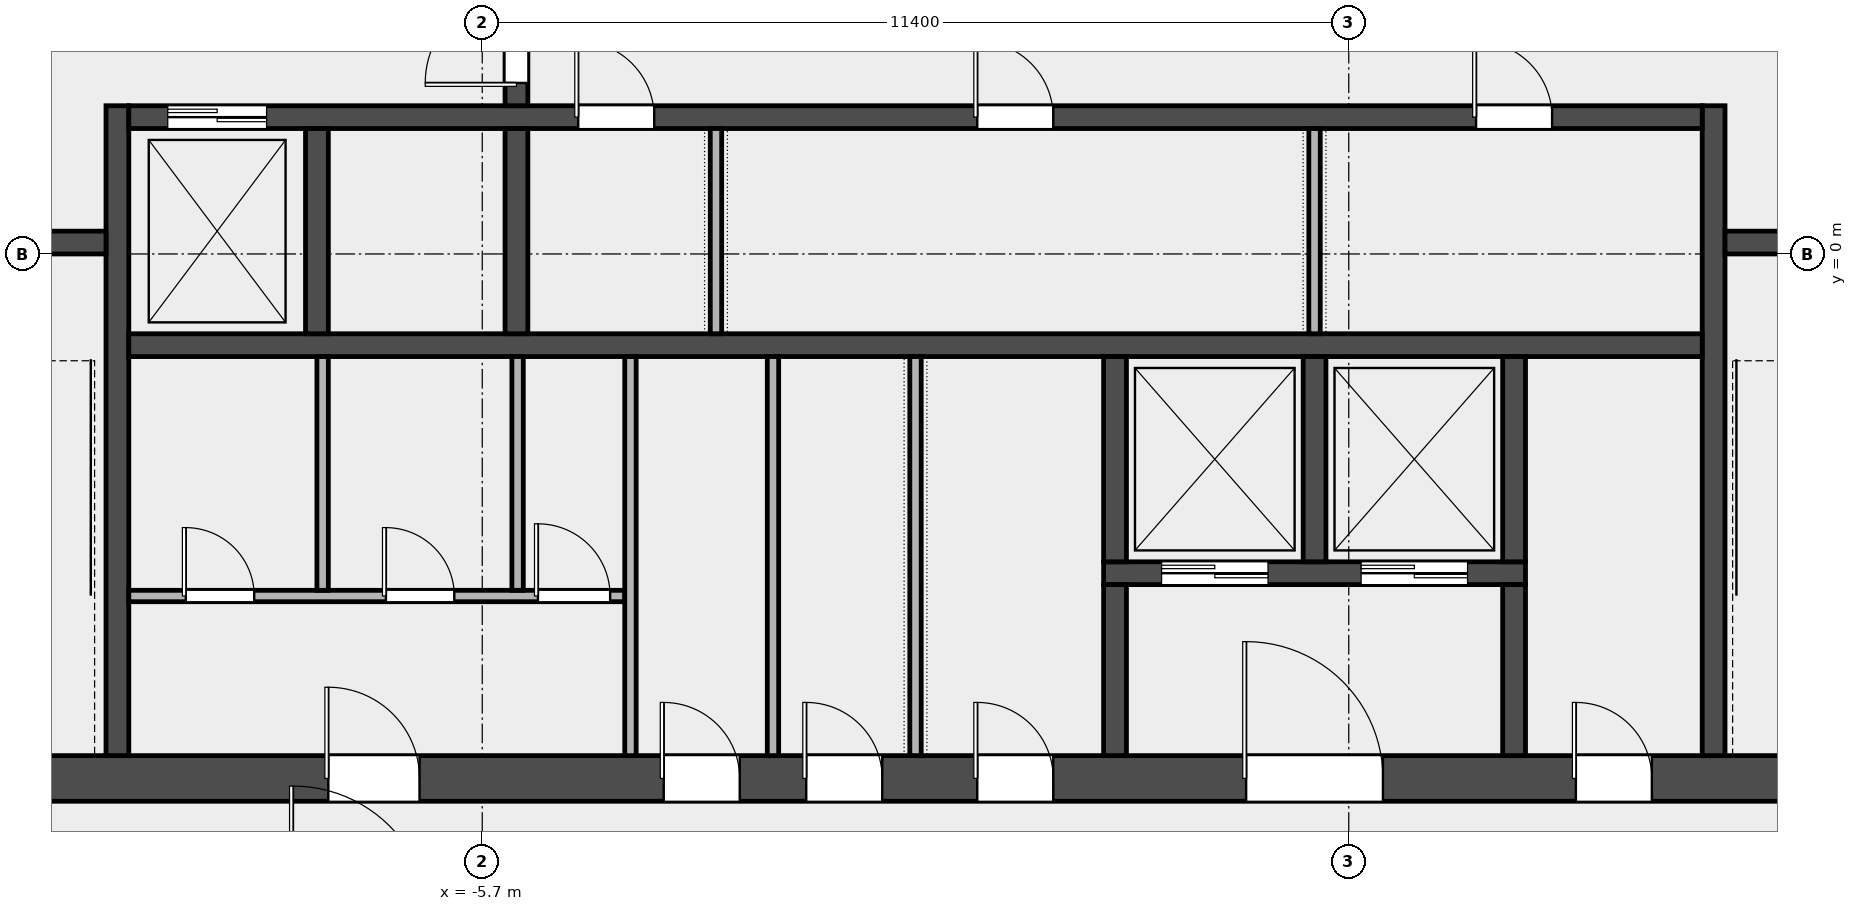
"""IFC4 building model, lengths in metres.
Left out: names, types, materials, properties, quantities, classifications, styles, units other than length and angle.
Written with IfcOpenShell. Run it as: python <this file> out.ifc"""

import sys

from ifc_helpers import new_model, si_unit, direction, frame, frame_2d, origin, place, context, subcontext, project, spatial, rectangle, extrude, element, fill, save


model = new_model("IFC4")
c1 = context("Model", 3, precision=1e-05, world=origin(), true_north=direction((0.0, 1.0)))
c2 = subcontext(c1, "Body", "Model", "MODEL_VIEW")
j1 = project(units=[si_unit("LENGTHUNIT", "METRE"), si_unit("PLANEANGLEUNIT", "RADIAN")], contexts=[c1])
p1 = place(None, origin())
s1 = spatial("IfcSite", under=j1, at=p1, CompositionType="ELEMENT")
p2 = place(p1, origin())
s2 = spatial("IfcBuilding", under=s1, at=p2, CompositionType="ELEMENT")
p3 = place(p2, frame((0.0, 0.0, 353.4)))
s3 = spatial("IfcBuildingStorey", under=s2, at=p3, CompositionType="ELEMENT", Elevation=353.4)
p4 = place(p3, frame((-14.4, -6.9, 0.0), z_axis=(0.0, 0.0, 1.0), x_axis=(1.0, 0.0, 0.0)))
e1 = element("IfcWall", 1, at=p4, inside=s3, PredefinedType="SHEAR", context=c2, shape_type="SweptSolid", body=[
    extrude(rectangle(XDim=28.8, YDim=0.6, at=frame_2d((14.4, 0.0))), origin(), (0.0, 0.0, 1.0), 3.7),
])
p5 = place(p4, frame((6.675, 0.0, 0.0)))
e2 = element("IfcOpeningElement", 2, at=p5, cuts=e1, PredefinedType="OPENING", context=c2, shape_type="SweptSolid", body=[
    extrude(rectangle(XDim=1.2, YDim=2.1, at=frame_2d((0.6, 1.05))), frame((0.0, 0.312, 0.0), z_axis=(0.0, -1.0, 0.0), x_axis=(1.0, 0.0, 0.0)), (0.0, 0.0, 1.0), 0.624),
])
p6 = place(p4, frame((11.087, 0.0, 0.0)))
e3 = element("IfcOpeningElement", 3, at=p6, cuts=e1, PredefinedType="OPENING", context=c2, shape_type="SweptSolid", body=[
    extrude(rectangle(XDim=1.0, YDim=2.1, at=frame_2d((0.5, 1.05))), frame((0.0, 0.312, 0.0), z_axis=(0.0, -1.0, 0.0), x_axis=(1.0, 0.0, 0.0)), (0.0, 0.0, 1.0), 0.624),
])
p7 = place(p4, frame((12.962, 0.0, 0.0)))
e4 = element("IfcOpeningElement", 4, at=p7, cuts=e1, PredefinedType="OPENING", context=c2, shape_type="SweptSolid", body=[
    extrude(rectangle(XDim=1.0, YDim=2.1, at=frame_2d((0.5, 1.05))), frame((0.0, 0.312, 0.0), z_axis=(0.0, -1.0, 0.0), x_axis=(1.0, 0.0, 0.0)), (0.0, 0.0, 1.0), 0.624),
])
p8 = place(p4, frame((15.212, 0.0, 0.0)))
e5 = element("IfcOpeningElement", 5, at=p8, cuts=e1, PredefinedType="OPENING", context=c2, shape_type="SweptSolid", body=[
    extrude(rectangle(XDim=1.0, YDim=2.1, at=frame_2d((0.5, 1.05))), frame((0.0, 0.312, 0.0), z_axis=(0.0, -1.0, 0.0), x_axis=(1.0, 0.0, 0.0)), (0.0, 0.0, 1.0), 0.624),
])
p9 = place(p4, frame((18.75, 0.0, 0.0)))
e6 = element("IfcOpeningElement", 6, at=p9, cuts=e1, PredefinedType="OPENING", context=c2, shape_type="SweptSolid", body=[
    extrude(rectangle(XDim=1.8, YDim=2.1, at=frame_2d((0.9, 1.05))), frame((0.0, 0.312, 0.0), z_axis=(0.0, -1.0, 0.0), x_axis=(1.0, 0.0, 0.0)), (0.0, 0.0, 1.0), 0.624),
])
p10 = place(p4, frame((23.087, 0.0, 0.0)))
e7 = element("IfcOpeningElement", 7, at=p10, cuts=e1, PredefinedType="OPENING", context=c2, shape_type="SweptSolid", body=[
    extrude(rectangle(XDim=1.0, YDim=2.1, at=frame_2d((0.5, 1.05))), frame((0.0, 0.312, 0.0), z_axis=(0.0, -1.0, 0.0), x_axis=(1.0, 0.0, 0.0)), (0.0, 0.0, 1.0), 0.624),
])
for number, where, z_axis, x_axis in (
    (8, (-10.5, -6.6, 0.0), (0.0, 0.0, 1.0), (0.0, 1.0, 0.0)),
    (9, (10.5, -6.6, 0.0), (0.0, 0.0, 1.0), (0.0, 1.0, 0.0)),
):
    element("IfcWall", number, at=place(p3, frame(where, z_axis=z_axis, x_axis=x_axis)), inside=s3, PredefinedType="SHEAR", context=c2, shape_type="SweptSolid", body=[
        extrude(rectangle(XDim=8.55, YDim=0.3, at=frame_2d((4.275, 0.0))), origin(), (0.0, 0.0, 1.0), 3.7),
    ])
p11 = place(p3, frame((-13.8, 0.15, 0.0), z_axis=(0.0, 0.0, 1.0), x_axis=(1.0, 0.0, 0.0)))
e10 = element("IfcWall", 10, at=p11, inside=s3, PredefinedType="SOLIDWALL", context=c2, shape_type="SweptSolid", body=[
    extrude(rectangle(XDim=3.15, YDim=0.3, at=frame_2d((1.575, 0.0))), origin(), (0.0, 0.0, 1.0), 3.7),
])
p12 = place(p11, frame((0.975, 0.0, 0.0)))
e11 = element("IfcOpeningElement", 11, at=p12, cuts=e10, PredefinedType="OPENING", context=c2, shape_type="SweptSolid", body=[
    extrude(rectangle(XDim=1.1, YDim=2.1, at=frame_2d((0.55, 1.05))), frame((0.0, 0.162, 0.0), z_axis=(0.0, -1.0, 0.0), x_axis=(1.0, 0.0, 0.0)), (0.0, 0.0, 1.0), 0.324),
])
p13 = place(p3, frame((10.65, 0.15, 0.0), z_axis=(0.0, 0.0, 1.0), x_axis=(1.0, 0.0, 0.0)))
e12 = element("IfcWall", 12, at=p13, inside=s3, PredefinedType="SOLIDWALL", context=c2, shape_type="SweptSolid", body=[
    extrude(rectangle(XDim=3.15, YDim=0.3, at=frame_2d((1.575, 0.0))), origin(), (0.0, 0.0, 1.0), 3.7),
])
p14 = place(p13, frame((1.025, 0.0, 0.0)))
e13 = element("IfcOpeningElement", 13, at=p14, cuts=e12, PredefinedType="OPENING", context=c2, shape_type="SweptSolid", body=[
    extrude(rectangle(XDim=1.1, YDim=2.1, at=frame_2d((0.55, 1.05))), frame((0.0, 0.162, 0.0), z_axis=(0.0, -1.0, 0.0), x_axis=(1.0, 0.0, 0.0)), (0.0, 0.0, 1.0), 0.324),
])
p15 = place(p3, frame((-10.35, -1.2, 0.0), z_axis=(0.0, 0.0, 1.0), x_axis=(1.0, 0.0, 0.0)))
e14 = element("IfcWall", 14, at=p15, inside=s3, PredefinedType="SOLIDWALL", context=c2, shape_type="SweptSolid", body=[
    extrude(rectangle(XDim=20.7, YDim=0.3, at=frame_2d((10.35, 0.0))), origin(), (0.0, 0.0, 1.0), 3.7),
])
p16 = place(p3, frame((-10.35, 1.8, 0.0), z_axis=(0.0, 0.0, 1.0), x_axis=(1.0, 0.0, 0.0)))
e15 = element("IfcWall", 15, at=p16, inside=s3, PredefinedType="SOLIDWALL", context=c2, shape_type="SweptSolid", body=[
    extrude(rectangle(XDim=20.7, YDim=0.3, at=frame_2d((10.35, 0.0))), origin(), (0.0, 0.0, 1.0), 3.7),
])
p17 = place(p16, frame((0.512, 0.0, 0.0)))
e16 = element("IfcOpeningElement", 16, at=p17, cuts=e15, PredefinedType="OPENING", context=c2, shape_type="SweptSolid", body=[
    extrude(rectangle(XDim=1.3, YDim=2.1, at=frame_2d((0.65, 1.05))), frame((0.0, 0.162, 0.0), z_axis=(0.0, -1.0, 0.0), x_axis=(1.0, 0.0, 0.0)), (0.0, 0.0, 1.0), 0.324),
])
p18 = place(p16, frame((5.913, 0.0, 0.0)))
e17 = element("IfcOpeningElement", 17, at=p18, cuts=e15, PredefinedType="OPENING", context=c2, shape_type="SweptSolid", body=[
    extrude(rectangle(XDim=1.0, YDim=2.1, at=frame_2d((0.5, 1.05))), frame((0.0, 0.162, 0.0), z_axis=(0.0, -1.0, 0.0), x_axis=(1.0, 0.0, 0.0)), (0.0, 0.0, 1.0), 0.324),
])
p19 = place(p16, frame((11.163, 0.0, 0.0)))
e18 = element("IfcOpeningElement", 18, at=p19, cuts=e15, PredefinedType="OPENING", context=c2, shape_type="SweptSolid", body=[
    extrude(rectangle(XDim=1.0, YDim=2.1, at=frame_2d((0.5, 1.05))), frame((0.0, 0.162, 0.0), z_axis=(0.0, -1.0, 0.0), x_axis=(1.0, 0.0, 0.0)), (0.0, 0.0, 1.0), 0.324),
])
p20 = place(p16, frame((17.725, 0.0, 0.0)))
e19 = element("IfcOpeningElement", 19, at=p20, cuts=e15, PredefinedType="OPENING", context=c2, shape_type="SweptSolid", body=[
    extrude(rectangle(XDim=1.0, YDim=2.1, at=frame_2d((0.5, 1.05))), frame((0.0, 0.162, 0.0), z_axis=(0.0, -1.0, 0.0), x_axis=(1.0, 0.0, 0.0)), (0.0, 0.0, 1.0), 0.324),
])
for number, where, z_axis, x_axis in (
    (20, (-7.875, -1.05, 0.0), (0.0, 0.0, 1.0), (0.0, 1.0, 0.0)),
    (21, (-5.25, -1.05, 0.0), (0.0, 0.0, 1.0), (0.0, 1.0, 0.0)),
):
    element("IfcWall", number, at=place(p3, frame(where, z_axis=z_axis, x_axis=x_axis)), inside=s3, PredefinedType="SOLIDWALL", context=c2, shape_type="SweptSolid", body=[
        extrude(rectangle(XDim=2.7, YDim=0.3, at=frame_2d((1.35, 0.0))), origin(), (0.0, 0.0, 1.0), 3.7),
    ])
p21 = place(p3, frame((-5.25, 1.95, 0.0), z_axis=(0.0, 0.0, 1.0), x_axis=(0.0, 1.0, 0.0)))
e22 = element("IfcWall", 22, at=p21, inside=s3, PredefinedType="SOLIDWALL", context=c2, shape_type="SweptSolid", body=[
    extrude(rectangle(XDim=3.3, YDim=0.3, at=frame_2d((1.65, 0.0))), origin(), (0.0, 0.0, 1.0), 3.7),
])
p22 = place(p21, frame((0.3, 0.0, 0.0)))
e23 = element("IfcOpeningElement", 23, at=p22, cuts=e22, PredefinedType="OPENING", context=c2, shape_type="SweptSolid", body=[
    extrude(rectangle(XDim=1.2, YDim=2.1, at=frame_2d((0.6, 1.05))), frame((0.0, 0.162, 0.0), z_axis=(0.0, -1.0, 0.0), x_axis=(1.0, 0.0, 0.0)), (0.0, 0.0, 1.0), 0.324),
])
p23 = place(p21, frame((1.8, 0.0, 0.0)))
e24 = element("IfcOpeningElement", 24, at=p23, cuts=e22, PredefinedType="OPENING", context=c2, shape_type="SweptSolid", body=[
    extrude(rectangle(XDim=1.2, YDim=2.1, at=frame_2d((0.6, 1.05))), frame((0.0, 0.162, 0.0), z_axis=(0.0, -1.0, 0.0), x_axis=(1.0, 0.0, 0.0)), (0.0, 0.0, 1.0), 0.324),
])
p24 = place(p3, frame((2.475, -4.2, 0.0), z_axis=(0.0, 0.0, 1.0), x_axis=(1.0, 0.0, 0.0)))
e25 = element("IfcWall", 25, at=p24, inside=s3, PredefinedType="SOLIDWALL", context=c2, shape_type="SweptSolid", body=[
    extrude(rectangle(XDim=5.55, YDim=0.3, at=frame_2d((2.775, 0.0))), origin(), (0.0, 0.0, 1.0), 3.7),
])
p25 = place(p24, frame((0.762, 0.0, 0.0)))
e26 = element("IfcOpeningElement", 26, at=p25, cuts=e25, PredefinedType="OPENING", context=c2, shape_type="SweptSolid", body=[
    extrude(rectangle(XDim=1.4, YDim=2.1, at=frame_2d((0.7, 1.05))), frame((0.0, 0.162, 0.0), z_axis=(0.0, -1.0, 0.0), x_axis=(1.0, 0.0, 0.0)), (0.0, 0.0, 1.0), 0.324),
])
p26 = place(p24, frame((3.387, 0.0, 0.0)))
e27 = element("IfcOpeningElement", 27, at=p26, cuts=e25, PredefinedType="OPENING", context=c2, shape_type="SweptSolid", body=[
    extrude(rectangle(XDim=1.4, YDim=2.1, at=frame_2d((0.7, 1.05))), frame((0.0, 0.162, 0.0), z_axis=(0.0, -1.0, 0.0), x_axis=(1.0, 0.0, 0.0)), (0.0, 0.0, 1.0), 0.324),
])
p27 = place(p3, frame((2.625, -4.05, 0.0), z_axis=(0.0, 0.0, 1.0), x_axis=(0.0, 1.0, 0.0)))
e28 = element("IfcWall", 28, at=p27, inside=s3, PredefinedType="SOLIDWALL", context=c2, shape_type="SweptSolid", body=[
    extrude(rectangle(XDim=2.7, YDim=0.3, at=frame_2d((1.35, 0.0))), origin(), (0.0, 0.0, 1.0), 3.7),
])
p28 = place(p3, frame((2.625, -6.6, 0.0), z_axis=(0.0, 0.0, 1.0), x_axis=(0.0, 1.0, 0.0)))
e29 = element("IfcWall", 29, at=p28, inside=s3, PredefinedType="SOLIDWALL", context=c2, shape_type="SweptSolid", body=[
    extrude(rectangle(XDim=2.25, YDim=0.3, at=frame_2d((1.125, 0.0))), origin(), (0.0, 0.0, 1.0), 3.7),
])
for number, where, z_axis, x_axis in (
    (30, (5.25, -4.05, 0.0), (0.0, 0.0, 1.0), (0.0, 1.0, 0.0)),
    (31, (7.875, -4.05, 0.0), (0.0, 0.0, 1.0), (0.0, 1.0, 0.0)),
):
    element("IfcWall", number, at=place(p3, frame(where, z_axis=z_axis, x_axis=x_axis)), inside=s3, PredefinedType="SOLIDWALL", context=c2, shape_type="SweptSolid", body=[
        extrude(rectangle(XDim=2.7, YDim=0.3, at=frame_2d((1.35, 0.0))), origin(), (0.0, 0.0, 1.0), 3.7),
    ])
p29 = place(p3, frame((7.875, -6.6, 0.0), z_axis=(0.0, 0.0, 1.0), x_axis=(0.0, 1.0, 0.0)))
e32 = element("IfcWall", 32, at=p29, inside=s3, PredefinedType="SOLIDWALL", context=c2, shape_type="SweptSolid", body=[
    extrude(rectangle(XDim=2.25, YDim=0.3, at=frame_2d((1.125, 0.0))), origin(), (0.0, 0.0, 1.0), 3.7),
])
p30 = place(p3, frame((-10.35, -4.5, 0.0), z_axis=(0.0, 0.0, 1.0), x_axis=(1.0, 0.0, 0.0)))
e33 = element("IfcWall", 33, at=p30, inside=s3, PredefinedType="PARTITIONING", context=c2, shape_type="SweptSolid", body=[
    extrude(rectangle(XDim=6.525, YDim=0.15, at=frame_2d((3.263, 0.0))), origin(), (0.0, 0.0, 1.0), 3.7),
])
p31 = place(p30, frame((0.75, 0.0, 0.0)))
e34 = element("IfcOpeningElement", 34, at=p31, cuts=e33, PredefinedType="OPENING", context=c2, shape_type="SweptSolid", body=[
    extrude(rectangle(XDim=0.9, YDim=2.1, at=frame_2d((0.45, 1.05))), frame((0.0, 0.087, 0.0), z_axis=(0.0, -1.0, 0.0), x_axis=(1.0, 0.0, 0.0)), (0.0, 0.0, 1.0), 0.174),
])
p32 = place(p30, frame((3.383, 0.0, 0.0)))
e35 = element("IfcOpeningElement", 35, at=p32, cuts=e33, PredefinedType="OPENING", context=c2, shape_type="SweptSolid", body=[
    extrude(rectangle(XDim=0.9, YDim=2.1, at=frame_2d((0.45, 1.05))), frame((0.0, 0.087, 0.0), z_axis=(0.0, -1.0, 0.0), x_axis=(1.0, 0.0, 0.0)), (0.0, 0.0, 1.0), 0.174),
])
p33 = place(p30, frame((5.383, 0.0, 0.0)))
e36 = element("IfcOpeningElement", 36, at=p33, cuts=e33, PredefinedType="OPENING", context=c2, shape_type="SweptSolid", body=[
    extrude(rectangle(XDim=0.95, YDim=2.1, at=frame_2d((0.475, 1.05))), frame((0.0, 0.087, 0.0), z_axis=(0.0, -1.0, 0.0), x_axis=(1.0, 0.0, 0.0)), (0.0, 0.0, 1.0), 0.174),
])
for number, where, z_axis, x_axis in (
    (37, (-7.8, -4.425, 0.0), (0.0, 0.0, 1.0), (0.0, 1.0, 0.0)),
    (38, (-5.235, -4.425, 0.0), (0.0, 0.0, 1.0), (0.0, 1.0, 0.0)),
):
    element("IfcWall", number, at=place(p3, frame(where, z_axis=z_axis, x_axis=x_axis)), inside=s3, PredefinedType="PARTITIONING", context=c2, shape_type="SweptSolid", body=[
        extrude(rectangle(XDim=3.075, YDim=0.15, at=frame_2d((1.538, 0.0))), origin(), (0.0, 0.0, 1.0), 3.7),
    ])
for number, where, z_axis, x_axis in (
    (39, (-3.75, -6.6, 0.0), (0.0, 0.0, 1.0), (0.0, 1.0, 0.0)),
    (40, (-1.875, -6.6, 0.0), (0.0, 0.0, 1.0), (0.0, 1.0, 0.0)),
    (41, (0.0, -6.6, 0.0), (0.0, 0.0, 1.0), (0.0, 1.0, 0.0)),
):
    element("IfcWall", number, at=place(p3, frame(where, z_axis=z_axis, x_axis=x_axis)), inside=s3, PredefinedType="PARTITIONING", context=c2, shape_type="SweptSolid", body=[
        extrude(rectangle(XDim=5.25, YDim=0.15, at=frame_2d((2.625, 0.0))), origin(), (0.0, 0.0, 1.0), 3.7),
    ])
for number, where, z_axis, x_axis in (
    (42, (-2.625, -1.05, 0.0), (0.0, 0.0, 1.0), (0.0, 1.0, 0.0)),
    (43, (5.25, -1.05, 0.0), (0.0, 0.0, 1.0), (0.0, 1.0, 0.0)),
):
    element("IfcWall", number, at=place(p3, frame(where, z_axis=z_axis, x_axis=x_axis)), inside=s3, PredefinedType="PARTITIONING", context=c2, shape_type="SweptSolid", body=[
        extrude(rectangle(XDim=2.7, YDim=0.15, at=frame_2d((1.35, 0.0))), origin(), (0.0, 0.0, 1.0), 3.7),
    ])
p34 = place(p22, origin())
e44 = element("IfcDoor", 44, at=p34, inside=s3, OperationType="SINGLE_SWING_LEFT", PredefinedType="DOOR", context=c2, shape_type="SweptSolid", body=[
    extrude(rectangle(XDim=1.2, YDim=2.1, at=frame_2d((0.6, 1.05))), frame((0.0, 0.025, 0.0), z_axis=(0.0, -1.0, 0.0), x_axis=(1.0, 0.0, 0.0)), (0.0, 0.0, 1.0), 0.05),
])
fill(e23, e44)
p35 = place(p17, origin())
e45 = element("IfcDoor", 45, at=p35, inside=s3, OperationType="DOUBLE_DOOR_SLIDING", PredefinedType="DOOR", context=c2, shape_type="SweptSolid", body=[
    extrude(rectangle(XDim=1.3, YDim=2.1, at=frame_2d((0.65, 1.05))), frame((0.0, 0.025, 0.0), z_axis=(0.0, -1.0, 0.0), x_axis=(1.0, 0.0, 0.0)), (0.0, 0.0, 1.0), 0.05),
])
fill(e16, e45)
p36 = place(p25, origin())
e46 = element("IfcDoor", 46, at=p36, inside=s3, OperationType="DOUBLE_DOOR_SLIDING", PredefinedType="DOOR", context=c2, shape_type="SweptSolid", body=[
    extrude(rectangle(XDim=1.4, YDim=2.1, at=frame_2d((0.7, 1.05))), frame((0.0, 0.025, 0.0), z_axis=(0.0, -1.0, 0.0), x_axis=(1.0, 0.0, 0.0)), (0.0, 0.0, 1.0), 0.05),
])
fill(e26, e46)
p37 = place(p26, origin())
e47 = element("IfcDoor", 47, at=p37, inside=s3, OperationType="DOUBLE_DOOR_SLIDING", PredefinedType="DOOR", context=c2, shape_type="SweptSolid", body=[
    extrude(rectangle(XDim=1.4, YDim=2.1, at=frame_2d((0.7, 1.05))), frame((0.0, 0.025, 0.0), z_axis=(0.0, -1.0, 0.0), x_axis=(1.0, 0.0, 0.0)), (0.0, 0.0, 1.0), 0.05),
])
fill(e27, e47)
p38 = place(p5, origin())
e48 = element("IfcDoor", 48, at=p38, inside=s3, OperationType="SINGLE_SWING_LEFT", PredefinedType="DOOR", context=c2, shape_type="SweptSolid", body=[
    extrude(rectangle(XDim=1.2, YDim=2.1, at=frame_2d((0.6, 1.05))), frame((0.0, 0.025, 0.0), z_axis=(0.0, -1.0, 0.0), x_axis=(1.0, 0.0, 0.0)), (0.0, 0.0, 1.0), 0.05),
])
fill(e2, e48)
p39 = place(p31, origin())
e49 = element("IfcDoor", 49, at=p39, inside=s3, OperationType="SINGLE_SWING_LEFT", PredefinedType="DOOR", context=c2, shape_type="SweptSolid", body=[
    extrude(rectangle(XDim=0.9, YDim=2.1, at=frame_2d((0.45, 1.05))), frame((0.0, 0.025, 0.0), z_axis=(0.0, -1.0, 0.0), x_axis=(1.0, 0.0, 0.0)), (0.0, 0.0, 1.0), 0.05),
])
fill(e34, e49)
p40 = place(p32, origin())
e50 = element("IfcDoor", 50, at=p40, inside=s3, OperationType="SINGLE_SWING_LEFT", PredefinedType="DOOR", context=c2, shape_type="SweptSolid", body=[
    extrude(rectangle(XDim=0.9, YDim=2.1, at=frame_2d((0.45, 1.05))), frame((0.0, 0.025, 0.0), z_axis=(0.0, -1.0, 0.0), x_axis=(1.0, 0.0, 0.0)), (0.0, 0.0, 1.0), 0.05),
])
fill(e35, e50)
p41 = place(p33, origin())
e51 = element("IfcDoor", 51, at=p41, inside=s3, OperationType="SINGLE_SWING_LEFT", PredefinedType="DOOR", context=c2, shape_type="SweptSolid", body=[
    extrude(rectangle(XDim=0.95, YDim=2.1, at=frame_2d((0.475, 1.05))), frame((0.0, 0.025, 0.0), z_axis=(0.0, -1.0, 0.0), x_axis=(1.0, 0.0, 0.0)), (0.0, 0.0, 1.0), 0.05),
])
fill(e36, e51)
p42 = place(p6, origin())
e52 = element("IfcDoor", 52, at=p42, inside=s3, OperationType="SINGLE_SWING_LEFT", PredefinedType="DOOR", context=c2, shape_type="SweptSolid", body=[
    extrude(rectangle(XDim=1.0, YDim=2.1, at=frame_2d((0.5, 1.05))), frame((0.0, 0.025, 0.0), z_axis=(0.0, -1.0, 0.0), x_axis=(1.0, 0.0, 0.0)), (0.0, 0.0, 1.0), 0.05),
])
fill(e3, e52)
p43 = place(p7, origin())
e53 = element("IfcDoor", 53, at=p43, inside=s3, OperationType="SINGLE_SWING_LEFT", PredefinedType="DOOR", context=c2, shape_type="SweptSolid", body=[
    extrude(rectangle(XDim=1.0, YDim=2.1, at=frame_2d((0.5, 1.05))), frame((0.0, 0.025, 0.0), z_axis=(0.0, -1.0, 0.0), x_axis=(1.0, 0.0, 0.0)), (0.0, 0.0, 1.0), 0.05),
])
fill(e4, e53)
p44 = place(p8, origin())
e54 = element("IfcDoor", 54, at=p44, inside=s3, OperationType="SINGLE_SWING_LEFT", PredefinedType="DOOR", context=c2, shape_type="SweptSolid", body=[
    extrude(rectangle(XDim=1.0, YDim=2.1, at=frame_2d((0.5, 1.05))), frame((0.0, 0.025, 0.0), z_axis=(0.0, -1.0, 0.0), x_axis=(1.0, 0.0, 0.0)), (0.0, 0.0, 1.0), 0.05),
])
fill(e5, e54)
p45 = place(p9, origin())
e55 = element("IfcDoor", 55, at=p45, inside=s3, OperationType="DOUBLE_DOOR_SINGLE_SWING", PredefinedType="DOOR", context=c2, shape_type="SweptSolid", body=[
    extrude(rectangle(XDim=1.8, YDim=2.1, at=frame_2d((0.9, 1.05))), frame((0.0, 0.025, 0.0), z_axis=(0.0, -1.0, 0.0), x_axis=(1.0, 0.0, 0.0)), (0.0, 0.0, 1.0), 0.05),
])
fill(e6, e55)
p46 = place(p10, origin())
e56 = element("IfcDoor", 56, at=p46, inside=s3, OperationType="SINGLE_SWING_LEFT", PredefinedType="DOOR", context=c2, shape_type="SweptSolid", body=[
    extrude(rectangle(XDim=1.0, YDim=2.1, at=frame_2d((0.5, 1.05))), frame((0.0, 0.025, 0.0), z_axis=(0.0, -1.0, 0.0), x_axis=(1.0, 0.0, 0.0)), (0.0, 0.0, 1.0), 0.05),
])
fill(e7, e56)
p47 = place(p18, origin())
e57 = element("IfcDoor", 57, at=p47, inside=s3, OperationType="SINGLE_SWING_LEFT", PredefinedType="DOOR", context=c2, shape_type="SweptSolid", body=[
    extrude(rectangle(XDim=1.0, YDim=2.1, at=frame_2d((0.5, 1.05))), frame((0.0, 0.025, 0.0), z_axis=(0.0, -1.0, 0.0), x_axis=(1.0, 0.0, 0.0)), (0.0, 0.0, 1.0), 0.05),
])
fill(e17, e57)
p48 = place(p19, origin())
e58 = element("IfcDoor", 58, at=p48, inside=s3, OperationType="SINGLE_SWING_LEFT", PredefinedType="DOOR", context=c2, shape_type="SweptSolid", body=[
    extrude(rectangle(XDim=1.0, YDim=2.1, at=frame_2d((0.5, 1.05))), frame((0.0, 0.025, 0.0), z_axis=(0.0, -1.0, 0.0), x_axis=(1.0, 0.0, 0.0)), (0.0, 0.0, 1.0), 0.05),
])
fill(e18, e58)
p49 = place(p20, origin())
e59 = element("IfcDoor", 59, at=p49, inside=s3, OperationType="SINGLE_SWING_LEFT", PredefinedType="DOOR", context=c2, shape_type="SweptSolid", body=[
    extrude(rectangle(XDim=1.0, YDim=2.1, at=frame_2d((0.5, 1.05))), frame((0.0, 0.025, 0.0), z_axis=(0.0, -1.0, 0.0), x_axis=(1.0, 0.0, 0.0)), (0.0, 0.0, 1.0), 0.05),
])
fill(e19, e59)
save(model, sys.argv[1])
